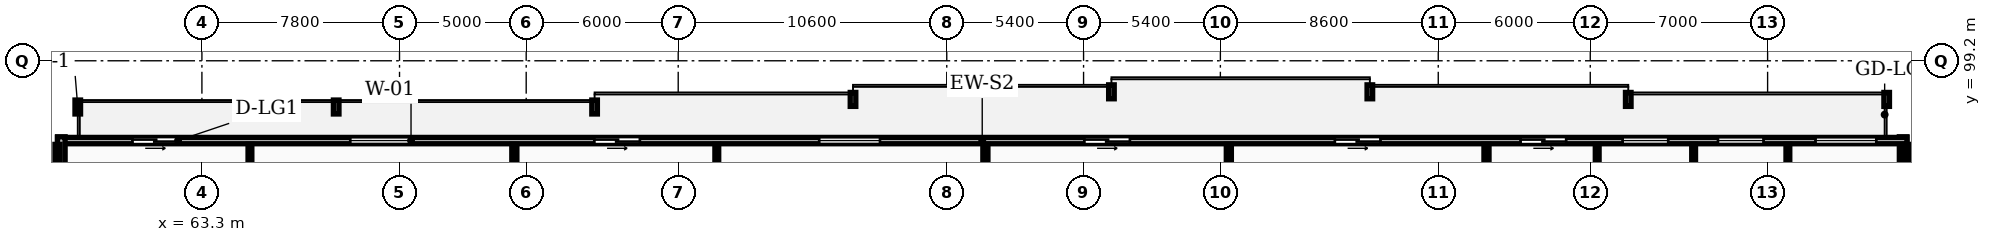
"""IFC4 building model, lengths in metres.
Left out: names, types, materials, properties, quantities, classifications, styles, units other than length and angle.
Written with IfcOpenShell. Run it as: python <this file> out.ifc"""

import sys

from ifc_helpers import new_model, si_unit, direction, frame, frame_2d, origin, place, context, subcontext, project, spatial, rectangle, extrude, element, fill, save


model = new_model("IFC4")
c1 = context("Model", 3, precision=1e-05, world=origin(), true_north=direction((0.0, 1.0)))
c2 = subcontext(c1, "Body", "Model", "MODEL_VIEW")
j1 = project(units=[si_unit("LENGTHUNIT", "METRE"), si_unit("PLANEANGLEUNIT", "RADIAN")], contexts=[c1])
p1 = place(None, origin())
s1 = spatial("IfcSite", under=j1, at=p1, CompositionType="ELEMENT")
p2 = place(p1, origin())
s2 = spatial("IfcBuilding", under=s1, at=p2, CompositionType="ELEMENT")
p3 = place(p2, frame((0.0, 0.0, 100.3)))
s3 = spatial("IfcBuildingStorey", under=s2, at=p3, CompositionType="ELEMENT", Elevation=100.3)
p4 = place(p3, frame((130.45, 92.6, 0.0), z_axis=(0.0, 0.0, 1.0), x_axis=(0.0, 1.0, 0.0)))
e1 = element("IfcWall", 1, at=p4, inside=s3, PredefinedType="STANDARD", context=c2, shape_type="SweptSolid", body=[
    extrude(rectangle(XDim=3.6, YDim=0.3, at=frame_2d((1.8, 0.0))), origin(), (0.0, 0.0, 1.0), 2.97),
])
p5 = place(p3, frame((130.6, 96.05, 0.0), z_axis=(0.0, 0.0, 1.0), x_axis=(-1.0, 0.0, 0.0)))
e2 = element("IfcWall", 2, at=p5, inside=s3, PredefinedType="STANDARD", context=c2, shape_type="SweptSolid", body=[
    extrude(rectangle(XDim=73.0, YDim=0.25, at=frame_2d((36.5, 0.0))), origin(), (0.0, 0.0, 1.0), 2.97),
])
p6 = place(p5, frame((68.242, 0.0, 0.0)))
e3 = element("IfcOpeningElement", 3, at=p6, cuts=e2, PredefinedType="OPENING", context=c2, shape_type="SweptSolid", body=[
    extrude(rectangle(XDim=1.8, YDim=2.2, at=frame_2d((0.9, 1.1))), frame((0.0, 0.135, 0.0), z_axis=(0.0, -1.0, 0.0), x_axis=(1.0, 0.0, 0.0)), (0.0, 0.0, 1.0), 0.27),
])
p7 = place(p5, frame((59.046, 0.0, 0.85)))
e4 = element("IfcOpeningElement", 4, at=p7, cuts=e2, PredefinedType="OPENING", context=c2, shape_type="SweptSolid", body=[
    extrude(rectangle(XDim=2.4, YDim=1.9, at=frame_2d((1.2, 0.95))), frame((0.0, 0.135, 0.0), z_axis=(0.0, -1.0, 0.0), x_axis=(1.0, 0.0, 0.0)), (0.0, 0.0, 1.0), 0.27),
])
p8 = place(p5, frame((50.012, 0.0, 0.0)))
e5 = element("IfcOpeningElement", 5, at=p8, cuts=e2, PredefinedType="OPENING", context=c2, shape_type="SweptSolid", body=[
    extrude(rectangle(XDim=1.8, YDim=2.2, at=frame_2d((0.9, 1.1))), frame((0.0, 0.135, 0.0), z_axis=(0.0, -1.0, 0.0), x_axis=(1.0, 0.0, 0.0)), (0.0, 0.0, 1.0), 0.27),
])
p9 = place(p5, frame((40.536, 0.0, 0.85)))
e6 = element("IfcOpeningElement", 6, at=p9, cuts=e2, PredefinedType="OPENING", context=c2, shape_type="SweptSolid", body=[
    extrude(rectangle(XDim=2.4, YDim=1.9, at=frame_2d((1.2, 0.95))), frame((0.0, 0.135, 0.0), z_axis=(0.0, -1.0, 0.0), x_axis=(1.0, 0.0, 0.0)), (0.0, 0.0, 1.0), 0.27),
])
p10 = place(p5, frame((30.67, 0.0, 0.0)))
e7 = element("IfcOpeningElement", 7, at=p10, cuts=e2, PredefinedType="OPENING", context=c2, shape_type="SweptSolid", body=[
    extrude(rectangle(XDim=1.8, YDim=2.2, at=frame_2d((0.9, 1.1))), frame((0.0, 0.135, 0.0), z_axis=(0.0, -1.0, 0.0), x_axis=(1.0, 0.0, 0.0)), (0.0, 0.0, 1.0), 0.27),
])
p11 = place(p5, frame((20.781, 0.0, 0.0)))
e8 = element("IfcOpeningElement", 8, at=p11, cuts=e2, PredefinedType="OPENING", context=c2, shape_type="SweptSolid", body=[
    extrude(rectangle(XDim=1.8, YDim=2.2, at=frame_2d((0.9, 1.1))), frame((0.0, 0.135, 0.0), z_axis=(0.0, -1.0, 0.0), x_axis=(1.0, 0.0, 0.0)), (0.0, 0.0, 1.0), 0.27),
])
p12 = place(p5, frame((9.423, 0.0, 0.85)))
e9 = element("IfcOpeningElement", 9, at=p12, cuts=e2, PredefinedType="OPENING", context=c2, shape_type="SweptSolid", body=[
    extrude(rectangle(XDim=1.8, YDim=1.8, at=frame_2d((0.9, 0.9))), frame((0.0, 0.135, 0.0), z_axis=(0.0, -1.0, 0.0), x_axis=(1.0, 0.0, 0.0)), (0.0, 0.0, 1.0), 0.27),
])
p13 = place(p5, frame((5.66, 0.0, 0.85)))
e10 = element("IfcOpeningElement", 10, at=p13, cuts=e2, PredefinedType="OPENING", context=c2, shape_type="SweptSolid", body=[
    extrude(rectangle(XDim=1.8, YDim=1.8, at=frame_2d((0.9, 0.9))), frame((0.0, 0.135, 0.0), z_axis=(0.0, -1.0, 0.0), x_axis=(1.0, 0.0, 0.0)), (0.0, 0.0, 1.0), 0.27),
])
p14 = place(p5, frame((13.451, 0.0, 0.0)))
e11 = element("IfcOpeningElement", 11, at=p14, cuts=e2, PredefinedType="OPENING", context=c2, shape_type="SweptSolid", body=[
    extrude(rectangle(XDim=1.8, YDim=2.2, at=frame_2d((0.9, 1.1))), frame((0.0, 0.135, 0.0), z_axis=(0.0, -1.0, 0.0), x_axis=(1.0, 0.0, 0.0)), (0.0, 0.0, 1.0), 0.27),
])
p15 = place(p5, frame((1.21, 0.0, 0.85)))
e12 = element("IfcOpeningElement", 12, at=p15, cuts=e2, PredefinedType="OPENING", context=c2, shape_type="SweptSolid", body=[
    extrude(rectangle(XDim=2.4, YDim=1.9, at=frame_2d((1.2, 0.95))), frame((0.0, 0.135, 0.0), z_axis=(0.0, -1.0, 0.0), x_axis=(1.0, 0.0, 0.0)), (0.0, 0.0, 1.0), 0.27),
])
p16 = place(p3, frame((57.75, 96.2, 0.0), z_axis=(0.0, 0.0, 1.0), x_axis=(0.0, -1.0, 0.0)))
e13 = element("IfcWall", 13, at=p16, inside=s3, PredefinedType="STANDARD", context=c2, shape_type="SweptSolid", body=[
    extrude(rectangle(XDim=3.6, YDim=0.3, at=frame_2d((1.8, 0.0))), origin(), (0.0, 0.0, 1.0), 2.97),
])
for number, where, z_axis, x_axis in (
    (14, (57.6, 69.83, 0.0), (0.0, 0.0, 1.0), (0.0, 1.0, 0.0)),
    (15, (130.6, 69.83, 0.0), (0.0, 0.0, 1.0), (0.0, 1.0, 0.0)),
    (16, (75.632, 69.83, 0.0), (0.0, 0.0, 1.0), (0.0, 1.0, 0.0)),
):
    element("IfcWall", number, at=place(p3, frame(where, z_axis=z_axis, x_axis=x_axis)), inside=s3, PredefinedType="PARTITIONING", context=c2, shape_type="SweptSolid", body=[
        extrude(rectangle(XDim=26.07, YDim=0.2, at=frame_2d((13.035, 0.0))), origin(), (0.0, 0.0, 1.0), 2.97),
    ])
p17 = place(p3, frame((65.196, 91.43, 0.0), z_axis=(0.0, 0.0, 1.0), x_axis=(0.0, 1.0, 0.0)))
e17 = element("IfcWall", 17, at=p17, inside=s3, PredefinedType="PARTITIONING", context=c2, shape_type="SweptSolid", body=[
    extrude(rectangle(XDim=4.47, YDim=0.15, at=frame_2d((2.235, 0.0))), origin(), (0.0, 0.0, 1.0), 2.97),
])
p18 = place(p3, frame((94.225, 69.83, 0.0), z_axis=(0.0, 0.0, 1.0), x_axis=(0.0, 1.0, 0.0)))
e18 = element("IfcWall", 18, at=p18, inside=s3, PredefinedType="PARTITIONING", context=c2, shape_type="SweptSolid", body=[
    extrude(rectangle(XDim=26.07, YDim=0.2, at=frame_2d((13.035, 0.0))), origin(), (0.0, 0.0, 1.0), 2.97),
])
p19 = place(p3, frame((83.624, 91.43, 0.0), z_axis=(0.0, 0.0, 1.0), x_axis=(0.0, 1.0, 0.0)))
e19 = element("IfcWall", 19, at=p19, inside=s3, PredefinedType="PARTITIONING", context=c2, shape_type="SweptSolid", body=[
    extrude(rectangle(XDim=4.47, YDim=0.15, at=frame_2d((2.235, 0.0))), origin(), (0.0, 0.0, 1.0), 2.97),
])
for number, where, z_axis, x_axis in (
    (20, (103.834, 69.83, 0.0), (0.0, 0.0, 1.0), (0.0, 1.0, 0.0)),
    (21, (114.004, 69.83, 0.0), (0.0, 0.0, 1.0), (0.0, 1.0, 0.0)),
):
    element("IfcWall", number, at=place(p3, frame(where, z_axis=z_axis, x_axis=x_axis)), inside=s3, PredefinedType="PARTITIONING", context=c2, shape_type="SweptSolid", body=[
        extrude(rectangle(XDim=26.07, YDim=0.2, at=frame_2d((13.035, 0.0))), origin(), (0.0, 0.0, 1.0), 2.97),
    ])
p20 = place(p3, frame((122.18, 91.43, 0.0), z_axis=(0.0, 0.0, 1.0), x_axis=(0.0, 1.0, 0.0)))
e22 = element("IfcWall", 22, at=p20, inside=s3, PredefinedType="PARTITIONING", context=c2, shape_type="SweptSolid", body=[
    extrude(rectangle(XDim=4.47, YDim=0.15, at=frame_2d((2.235, 0.0))), origin(), (0.0, 0.0, 1.0), 2.97),
])
p21 = place(p3, frame((118.374, 86.29, 0.0), z_axis=(0.0, 0.0, 1.0), x_axis=(0.0, 1.0, 0.0)))
e23 = element("IfcWall", 23, at=p21, inside=s3, PredefinedType="PARTITIONING", context=c2, shape_type="SweptSolid", body=[
    extrude(rectangle(XDim=9.61, YDim=0.15, at=frame_2d((4.805, 0.0))), origin(), (0.0, 0.0, 1.0), 2.97),
])
p22 = place(p21, frame((2.77, 0.0, 0.0)))
e24 = element("IfcOpeningElement", 24, at=p22, cuts=e23, PredefinedType="OPENING", context=c2, shape_type="SweptSolid", body=[
    extrude(rectangle(XDim=0.92, YDim=2.08, at=frame_2d((0.46, 1.04))), frame((0.0, 0.085, 0.0), z_axis=(0.0, -1.0, 0.0), x_axis=(1.0, 0.0, 0.0)), (0.0, 0.0, 1.0), 0.17),
])
p23 = place(p3, frame((125.9, 88.8, 0.0), z_axis=(0.0, 0.0, 1.0), x_axis=(0.0, 1.0, 0.0)))
e25 = element("IfcWall", 25, at=p23, inside=s3, PredefinedType="PARTITIONING", context=c2, shape_type="SweptSolid", body=[
    extrude(rectangle(XDim=7.1, YDim=0.15, at=frame_2d((3.55, 0.0))), origin(), (0.0, 0.0, 1.0), 2.97),
])
p24 = place(p23, frame((0.26, 0.0, 0.0)))
e26 = element("IfcOpeningElement", 26, at=p24, cuts=e25, PredefinedType="OPENING", context=c2, shape_type="SweptSolid", body=[
    extrude(rectangle(XDim=0.92, YDim=2.08, at=frame_2d((0.46, 1.04))), frame((0.0, 0.085, 0.0), z_axis=(0.0, -1.0, 0.0), x_axis=(1.0, 0.0, 0.0)), (0.0, 0.0, 1.0), 0.17),
])
p25 = place(p6, origin())
e27 = element("IfcDoor", 27, at=p25, inside=s3, OperationType="SLIDING_TO_LEFT", PredefinedType="DOOR", context=c2, shape_type="SweptSolid", body=[
    extrude(rectangle(XDim=1.8, YDim=2.2, at=frame_2d((0.9, 1.1))), frame((0.0, 0.025, 0.0), z_axis=(0.0, -1.0, 0.0), x_axis=(1.0, 0.0, 0.0)), (0.0, 0.0, 1.0), 0.05),
])
fill(e3, e27)
p26 = place(p7, origin())
e28 = element("IfcWindow", 28, at=p26, inside=s3, PartitioningType="DOUBLE_PANEL_VERTICAL", PredefinedType="WINDOW", context=c2, shape_type="SweptSolid", body=[
    extrude(rectangle(XDim=2.4, YDim=1.9, at=frame_2d((1.2, 0.95))), frame((0.0, 0.03, 0.0), z_axis=(0.0, -1.0, 0.0), x_axis=(1.0, 0.0, 0.0)), (0.0, 0.0, 1.0), 0.06),
])
fill(e4, e28)
p27 = place(p8, origin())
e29 = element("IfcDoor", 29, at=p27, inside=s3, OperationType="SLIDING_TO_LEFT", PredefinedType="DOOR", context=c2, shape_type="SweptSolid", body=[
    extrude(rectangle(XDim=1.8, YDim=2.2, at=frame_2d((0.9, 1.1))), frame((0.0, 0.025, 0.0), z_axis=(0.0, -1.0, 0.0), x_axis=(1.0, 0.0, 0.0)), (0.0, 0.0, 1.0), 0.05),
])
fill(e5, e29)
p28 = place(p9, origin())
e30 = element("IfcWindow", 30, at=p28, inside=s3, PartitioningType="DOUBLE_PANEL_VERTICAL", PredefinedType="WINDOW", context=c2, shape_type="SweptSolid", body=[
    extrude(rectangle(XDim=2.4, YDim=1.9, at=frame_2d((1.2, 0.95))), frame((0.0, 0.03, 0.0), z_axis=(0.0, -1.0, 0.0), x_axis=(1.0, 0.0, 0.0)), (0.0, 0.0, 1.0), 0.06),
])
fill(e6, e30)
p29 = place(p10, origin())
e31 = element("IfcDoor", 31, at=p29, inside=s3, OperationType="SLIDING_TO_LEFT", PredefinedType="DOOR", context=c2, shape_type="SweptSolid", body=[
    extrude(rectangle(XDim=1.8, YDim=2.2, at=frame_2d((0.9, 1.1))), frame((0.0, 0.025, 0.0), z_axis=(0.0, -1.0, 0.0), x_axis=(1.0, 0.0, 0.0)), (0.0, 0.0, 1.0), 0.05),
])
fill(e7, e31)
p30 = place(p11, origin())
e32 = element("IfcDoor", 32, at=p30, inside=s3, OperationType="SLIDING_TO_LEFT", PredefinedType="DOOR", context=c2, shape_type="SweptSolid", body=[
    extrude(rectangle(XDim=1.8, YDim=2.2, at=frame_2d((0.9, 1.1))), frame((0.0, 0.025, 0.0), z_axis=(0.0, -1.0, 0.0), x_axis=(1.0, 0.0, 0.0)), (0.0, 0.0, 1.0), 0.05),
])
fill(e8, e32)
p31 = place(p12, origin())
e33 = element("IfcWindow", 33, at=p31, inside=s3, PartitioningType="SINGLE_PANEL", PredefinedType="WINDOW", context=c2, shape_type="SweptSolid", body=[
    extrude(rectangle(XDim=1.8, YDim=1.8, at=frame_2d((0.9, 0.9))), frame((0.0, 0.03, 0.0), z_axis=(0.0, -1.0, 0.0), x_axis=(1.0, 0.0, 0.0)), (0.0, 0.0, 1.0), 0.06),
])
fill(e9, e33)
p32 = place(p13, origin())
e34 = element("IfcWindow", 34, at=p32, inside=s3, PartitioningType="SINGLE_PANEL", PredefinedType="WINDOW", context=c2, shape_type="SweptSolid", body=[
    extrude(rectangle(XDim=1.8, YDim=1.8, at=frame_2d((0.9, 0.9))), frame((0.0, 0.03, 0.0), z_axis=(0.0, -1.0, 0.0), x_axis=(1.0, 0.0, 0.0)), (0.0, 0.0, 1.0), 0.06),
])
fill(e10, e34)
p33 = place(p14, origin())
e35 = element("IfcDoor", 35, at=p33, inside=s3, OperationType="SLIDING_TO_LEFT", PredefinedType="DOOR", context=c2, shape_type="SweptSolid", body=[
    extrude(rectangle(XDim=1.8, YDim=2.2, at=frame_2d((0.9, 1.1))), frame((0.0, 0.025, 0.0), z_axis=(0.0, -1.0, 0.0), x_axis=(1.0, 0.0, 0.0)), (0.0, 0.0, 1.0), 0.05),
])
fill(e11, e35)
p34 = place(p15, origin())
e36 = element("IfcWindow", 36, at=p34, inside=s3, PartitioningType="DOUBLE_PANEL_VERTICAL", PredefinedType="WINDOW", context=c2, shape_type="SweptSolid", body=[
    extrude(rectangle(XDim=2.4, YDim=1.9, at=frame_2d((1.2, 0.95))), frame((0.0, 0.03, 0.0), z_axis=(0.0, -1.0, 0.0), x_axis=(1.0, 0.0, 0.0)), (0.0, 0.0, 1.0), 0.06),
])
fill(e12, e36)
save(model, sys.argv[1])
